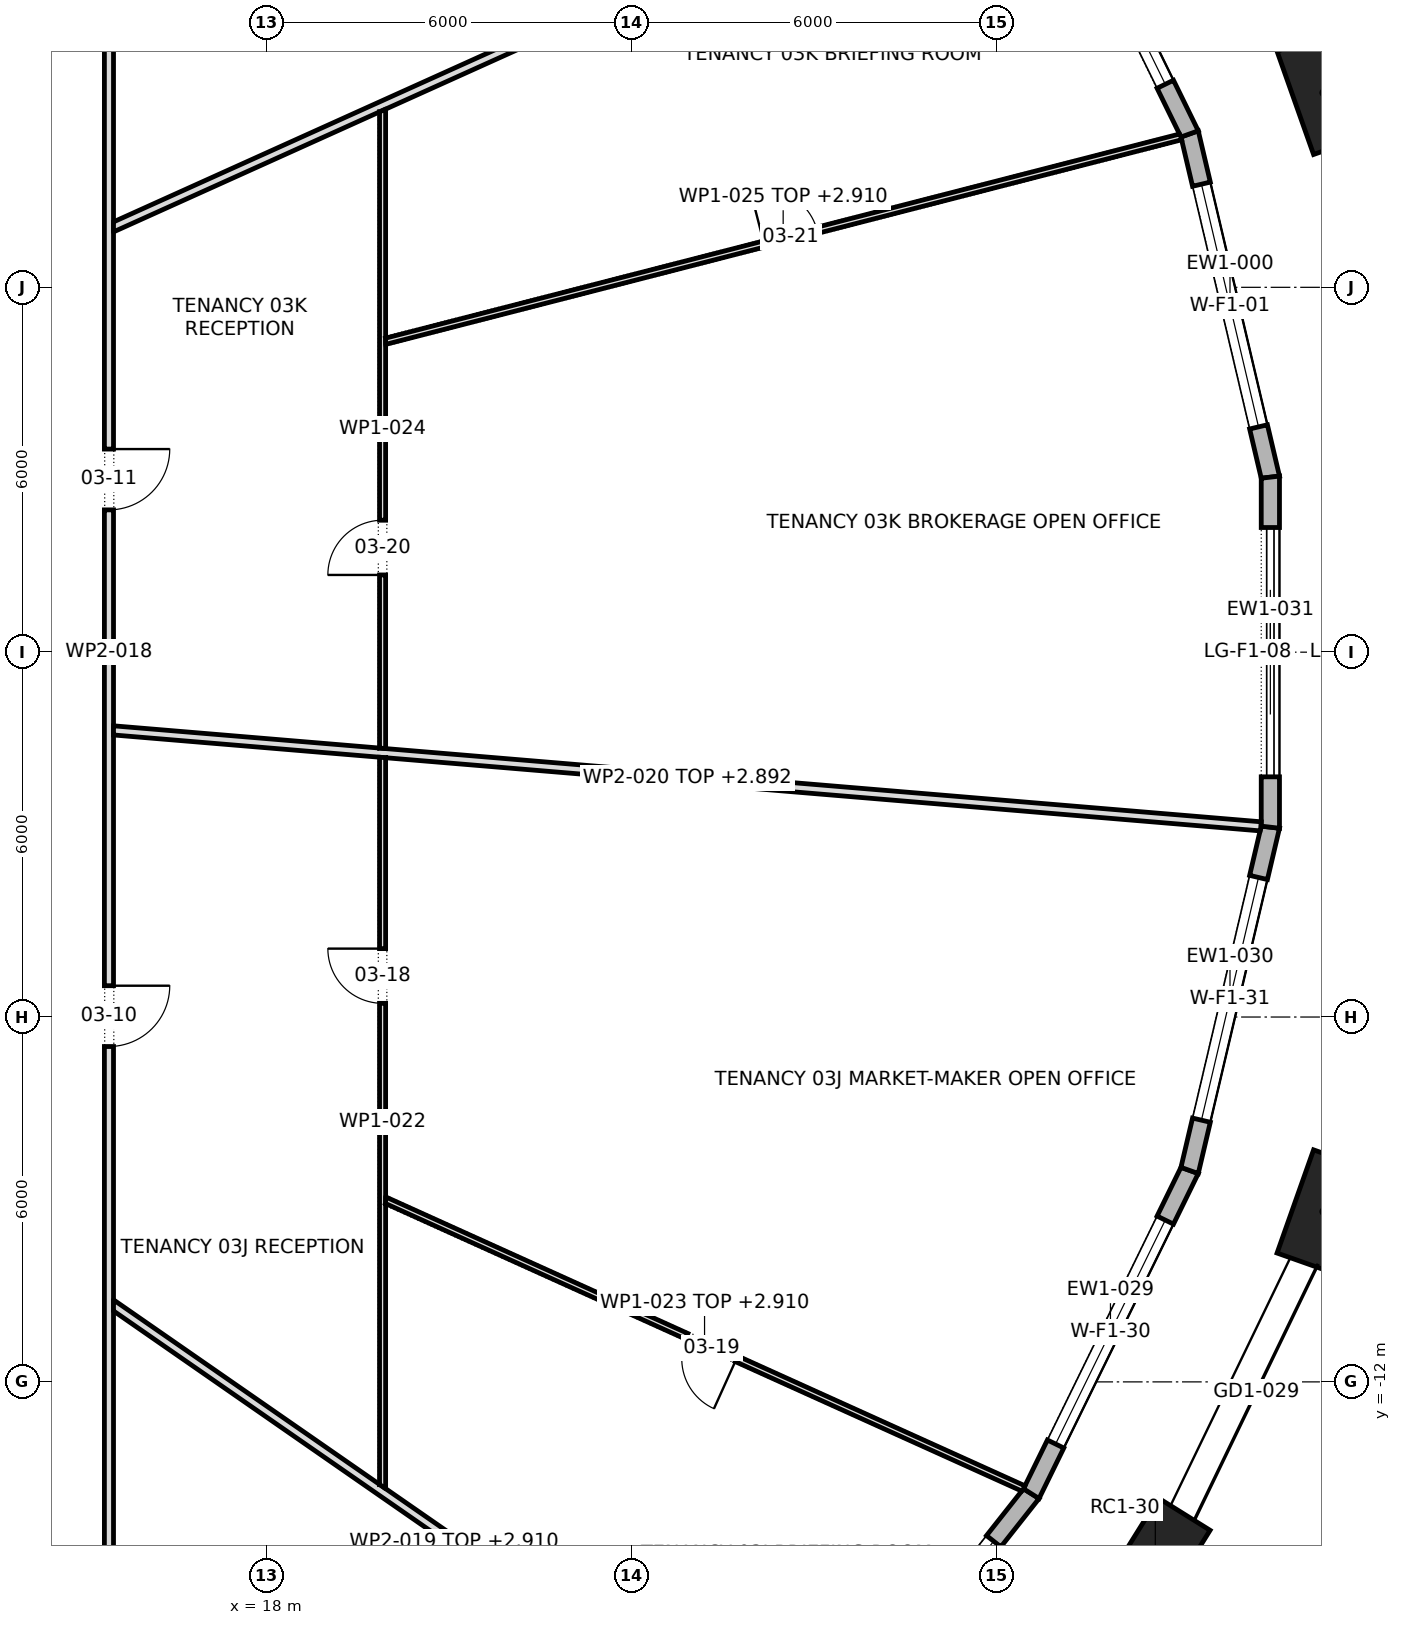
"""IFC4 building model, lengths in metres.
Left out: names, types, materials, properties, quantities, classifications, styles, units other than length and angle.
Written with IfcOpenShell. Run it as: python <this file> out.ifc"""

import sys

from ifc_helpers import new_model, si_unit, direction, frame, frame_2d, origin, origin_2d, place, context, subcontext, project, spatial, polyline, rectangle, outline, extrude, element, fill, save


model = new_model("IFC4")
c1 = context("Model", 3, precision=1e-05, world=origin(), true_north=direction((0.0, 1.0)))
c2 = subcontext(c1, "Body", "Model", "MODEL_VIEW")
j1 = project(units=[si_unit("LENGTHUNIT", "METRE"), si_unit("PLANEANGLEUNIT", "RADIAN")], contexts=[c1])
p1 = place(None, origin())
s1 = spatial("IfcSite", under=j1, at=p1, CompositionType="ELEMENT")
p2 = place(p1, origin())
s2 = spatial("IfcBuilding", under=s1, at=p2, CompositionType="ELEMENT")
p3 = place(p2, frame((0.0, 0.0, 57.1)))
s3 = spatial("IfcBuildingStorey", under=s2, at=p3, CompositionType="ELEMENT", Elevation=57.1)
for number, where, z_axis, x_axis in (
    (1, (35.382, 9.2, 0.0), (0.0, 0.0, 1.0), (-0.334, 0.943, 0.0)),
    (2, (32.608, -14.939, 0.0), (0.0, 0.0, 1.0), (0.529, 0.849, 0.0)),
    (3, (35.382, -9.2, 0.0), (0.0, 0.0, 1.0), (0.334, 0.943, 0.0)),
):
    element("IfcColumn", number, at=place(p3, frame(where, z_axis=z_axis, x_axis=x_axis)), inside=s3, PredefinedType="COLUMN", context=c2, shape_type="SweptSolid", body=[
        extrude(rectangle(XDim=1.8, YDim=1.0, at=origin_2d()), origin(), (0.0, 0.0, 1.0), 4.2),
    ])
p4 = place(p3, frame((34.5, 2.878, 0.0), z_axis=(0.0, 0.0, 1.0), x_axis=(-0.228990053972, 0.973428762253, 0.0)))
e4 = element("IfcWall", 4, at=p4, inside=s3, PredefinedType="STANDARD", context=c2, shape_type="SweptSolid", body=[
    extrude(outline(polyline([(-0.017, -0.15), (5.816, -0.15), (5.782, 0.15), (0.017, 0.15), (-0.017, -0.15)])), origin(), (0.0, 0.0, 1.0), 3.9),
])
p5 = place(p4, frame((0.849, 0.0, 0.6)))
e5 = element("IfcOpeningElement", 5, at=p5, cuts=e4, PredefinedType="OPENING", context=c2, shape_type="SweptSolid", body=[
    extrude(rectangle(XDim=4.1, YDim=2.85, at=frame_2d((2.05, 1.425))), frame((0.0, 0.162, 0.0), z_axis=(0.0, -1.0, 0.0), x_axis=(1.0, 0.0, 0.0)), (0.0, 0.0, 1.0), 0.324),
])
p6 = place(p3, frame((33.172, 8.523, 0.0), z_axis=(0.0, 0.0, 1.0), x_axis=(-0.439906146647, 0.898043752911, 0.0)))
e6 = element("IfcWall", 6, at=p6, inside=s3, PredefinedType="STANDARD", context=c2, shape_type="SweptSolid", body=[
    extrude(outline(polyline([(-0.017, -0.15), (5.935, -0.15), (5.903, 0.15), (0.017, 0.15), (-0.017, -0.15)])), origin(), (0.0, 0.0, 1.0), 3.9),
])
p7 = place(p6, frame((0.909, 0.0, 0.6)))
e7 = element("IfcOpeningElement", 7, at=p7, cuts=e6, PredefinedType="OPENING", context=c2, shape_type="SweptSolid", body=[
    extrude(rectangle(XDim=4.1, YDim=2.85, at=frame_2d((2.05, 1.425))), frame((0.0, 0.162, 0.0), z_axis=(0.0, -1.0, 0.0), x_axis=(1.0, 0.0, 0.0)), (0.0, 0.0, 1.0), 0.324),
])
p8 = place(p3, frame((26.79, -18.62, 0.0), z_axis=(0.0, 0.0, 1.0), x_axis=(0.619993638342, 0.78460683684, 0.0)))
e8 = element("IfcWall", 8, at=p8, inside=s3, PredefinedType="STANDARD", context=c2, shape_type="SweptSolid", body=[
    extrude(outline(polyline([(-0.015, -0.15), (6.11, -0.15), (6.078, 0.15), (0.015, 0.15), (-0.015, -0.15)])), origin(), (0.0, 0.0, 1.0), 3.9),
])
p9 = place(p8, frame((0.997, 0.0, 0.6)))
e9 = element("IfcOpeningElement", 9, at=p9, cuts=e8, PredefinedType="OPENING", context=c2, shape_type="SweptSolid", body=[
    extrude(rectangle(XDim=4.1, YDim=2.85, at=frame_2d((2.05, 1.425))), frame((0.0, 0.162, 0.0), z_axis=(0.0, -1.0, 0.0), x_axis=(1.0, 0.0, 0.0)), (0.0, 0.0, 1.0), 0.324),
])
p10 = place(p3, frame((30.568, -13.838, 0.0), z_axis=(0.0, 0.0, 1.0), x_axis=(0.439906146647, 0.898043752911, 0.0)))
e10 = element("IfcWall", 10, at=p10, inside=s3, PredefinedType="STANDARD", context=c2, shape_type="SweptSolid", body=[
    extrude(outline(polyline([(-0.016, -0.15), (5.936, -0.15), (5.902, 0.15), (0.016, 0.15), (-0.016, -0.15)])), origin(), (0.0, 0.0, 1.0), 3.9),
])
p11 = place(p10, frame((0.909, 0.0, 0.6)))
e11 = element("IfcOpeningElement", 11, at=p11, cuts=e10, PredefinedType="OPENING", context=c2, shape_type="SweptSolid", body=[
    extrude(rectangle(XDim=4.1, YDim=2.85, at=frame_2d((2.05, 1.425))), frame((0.0, 0.162, 0.0), z_axis=(0.0, -1.0, 0.0), x_axis=(1.0, 0.0, 0.0)), (0.0, 0.0, 1.0), 0.324),
])
p12 = place(p3, frame((33.172, -8.523, 0.0), z_axis=(0.0, 0.0, 1.0), x_axis=(0.228990053972, 0.973428762253, 0.0)))
e12 = element("IfcWall", 12, at=p12, inside=s3, PredefinedType="STANDARD", context=c2, shape_type="SweptSolid", body=[
    extrude(outline(polyline([(-0.017, -0.15), (5.816, -0.15), (5.781, 0.15), (0.017, 0.15), (-0.017, -0.15)])), origin(), (0.0, 0.0, 1.0), 3.9),
])
p13 = place(p12, frame((0.849, 0.0, 0.6)))
e13 = element("IfcOpeningElement", 13, at=p13, cuts=e12, PredefinedType="OPENING", context=c2, shape_type="SweptSolid", body=[
    extrude(rectangle(XDim=4.1, YDim=2.85, at=frame_2d((2.05, 1.425))), frame((0.0, 0.162, 0.0), z_axis=(0.0, -1.0, 0.0), x_axis=(1.0, 0.0, 0.0)), (0.0, 0.0, 1.0), 0.324),
])
p14 = place(p3, frame((34.5, -2.878, 0.0), z_axis=(0.0, 0.0, 1.0), x_axis=(0.0, 1.0, 0.0)))
e14 = element("IfcWall", 14, at=p14, inside=s3, PredefinedType="STANDARD", context=c2, shape_type="SweptSolid", body=[
    extrude(outline(polyline([(-0.017, -0.15), (5.773, -0.15), (5.739, 0.15), (0.017, 0.15), (-0.017, -0.15)])), origin(), (0.0, 0.0, 1.0), 3.9),
])
p15 = place(p14, frame((0.828, 0.0, 0.0)))
e15 = element("IfcOpeningElement", 15, at=p15, cuts=e14, PredefinedType="OPENING", context=c2, shape_type="SweptSolid", body=[
    extrude(rectangle(XDim=4.1, YDim=3.45, at=frame_2d((2.05, 1.725))), frame((0.0, 0.162, 0.0), z_axis=(0.0, -1.0, 0.0), x_axis=(1.0, 0.0, 0.0)), (0.0, 0.0, 1.0), 0.324),
])
p16 = place(p3, frame((15.4, -15.475, 0.0), z_axis=(0.0, 0.0, 1.0), x_axis=(0.0, 1.0, 0.0)))
e16 = element("IfcWall", 16, at=p16, inside=s3, PredefinedType="PARTITIONING", context=c2, shape_type="SweptSolid", body=[
    extrude(outline(polyline([(0.0, -0.075), (1.935, -0.075), (3.869, -0.075), (5.803, -0.075), (7.738, -0.075), (9.672, -0.075), (11.606, -0.075), (13.541, -0.075), (15.475, -0.075), (17.409, -0.075), (19.344, -0.075), (21.278, -0.075), (23.212, -0.075), (25.147, -0.075), (27.081, -0.075), (29.016, -0.075), (30.95, -0.075), (30.8, 0.075), (28.885, 0.075), (26.969, 0.075), (25.053, 0.075), (23.138, 0.075), (21.222, 0.075), (19.306, 0.075), (17.391, 0.075), (15.475, 0.075), (13.56, 0.075), (11.644, 0.075), (9.728, 0.075), (7.812, 0.075), (5.897, 0.075), (3.981, 0.075), (2.066, 0.075), (0.15, 0.075), (0.0, -0.075)])), origin(), (0.0, 0.0, 1.0), 3.9),
])
p17 = place(p16, frame((8.99, 0.0, 0.0)))
e17 = element("IfcOpeningElement", 17, at=p17, cuts=e16, PredefinedType="OPENING", context=c2, shape_type="SweptSolid", body=[
    extrude(rectangle(XDim=1.0, YDim=2.1, at=frame_2d((0.5, 1.05))), frame((0.0, 0.087, 0.0), z_axis=(0.0, -1.0, 0.0), x_axis=(1.0, 0.0, 0.0)), (0.0, 0.0, 1.0), 0.174),
])
p18 = place(p16, frame((17.815, 0.0, 0.0)))
e18 = element("IfcOpeningElement", 18, at=p18, cuts=e16, PredefinedType="OPENING", context=c2, shape_type="SweptSolid", body=[
    extrude(rectangle(XDim=1.0, YDim=2.1, at=frame_2d((0.5, 1.05))), frame((0.0, 0.087, 0.0), z_axis=(0.0, -1.0, 0.0), x_axis=(1.0, 0.0, 0.0)), (0.0, 0.0, 1.0), 0.174),
])
p19 = place(p16, frame((26.155, 0.0, 0.0)))
e19 = element("IfcOpeningElement", 19, at=p19, cuts=e16, PredefinedType="OPENING", context=c2, shape_type="SweptSolid", body=[
    extrude(rectangle(XDim=1.0, YDim=2.1, at=frame_2d((0.5, 1.05))), frame((0.0, 0.087, 0.0), z_axis=(0.0, -1.0, 0.0), x_axis=(1.0, 0.0, 0.0)), (0.0, 0.0, 1.0), 0.174),
])
p20 = place(p3, frame((15.433, -10.712, 0.0), z_axis=(0.0, 0.0, 1.0), x_axis=(0.82159356676, -0.570073689148, 0.0)))
e20 = element("IfcWall", 20, at=p20, inside=s3, PredefinedType="PARTITIONING", context=c2, shape_type="SweptSolid", body=[
    extrude(outline(polyline([(0.104, -0.075), (2.042, -0.075), (3.979, -0.075), (5.917, -0.075), (7.855, -0.075), (9.793, -0.075), (11.731, -0.075), (13.669, -0.075), (13.69, 0.002), (13.694, 0.074), (13.694, 0.075), (12.021, 0.075), (10.349, 0.075), (8.676, 0.075), (7.004, 0.075), (5.331, 0.075), (5.327, 0.072), (5.325, 0.075), (3.55, 0.075), (1.775, 0.075), (0.0, 0.075), (0.0, 0.074), (0.104, -0.075)])), origin(), (0.0, 0.0, 1.0), 2.91),
])
p21 = place(p3, frame((15.469, -1.286, 0.0), z_axis=(0.0, 0.0, 1.0), x_axis=(0.996520554602, -0.083347371018, 0.0)))
e21 = element("IfcWall", 21, at=p21, inside=s3, PredefinedType="PARTITIONING", context=c2, shape_type="SweptSolid", body=[
    extrude(outline(polyline([(0.012, -0.075), (1.506, -0.075), (2.999, -0.075), (4.492, -0.075), (4.503, -0.074), (4.503, -0.075), (6.307, -0.075), (8.111, -0.075), (9.915, -0.075), (11.719, -0.075), (13.523, -0.075), (15.327, -0.075), (17.131, -0.075), (18.935, -0.075), (18.94, -0.038), (18.94, 0.075), (17.122, 0.075), (15.304, 0.075), (13.486, 0.075), (11.667, 0.075), (9.849, 0.075), (8.031, 0.075), (6.213, 0.075), (4.395, 0.075), (4.39, 0.074), (4.39, 0.075), (2.927, 0.075), (1.463, 0.075), (0.0, 0.075), (0.012, -0.075)])), origin(), (0.0, 0.0, 1.0), 2.892),
])
p22 = place(p3, frame((15.444, 6.98, 0.0), z_axis=(0.0, 0.0, 1.0), x_axis=(0.911545333682, 0.411199592221, 0.0)))
e22 = element("IfcWall", 22, at=p22, inside=s3, PredefinedType="PARTITIONING", context=c2, shape_type="SweptSolid", body=[
    extrude(outline(polyline([(0.0, -0.075), (1.6, -0.075), (3.2, -0.075), (4.8, -0.075), (4.801, -0.073), (4.805, -0.075), (6.747, -0.075), (8.69, -0.075), (10.632, -0.075), (12.574, -0.075), (14.517, -0.075), (16.459, -0.075), (16.459, -0.072), (16.457, 0.012), (16.441, 0.075), (14.622, 0.075), (12.802, 0.075), (10.983, 0.075), (9.164, 0.075), (7.345, 0.075), (5.525, 0.075), (3.706, 0.075), (1.887, 0.075), (0.068, 0.075), (0.0, -0.075)])), origin(), (0.0, 0.0, 1.0), 2.91),
])
p23 = place(p3, frame((19.9, -13.756, 0.0), z_axis=(0.0, 0.0, 1.0), x_axis=(0.0, 1.0, 0.0)))
e23 = element("IfcWall", 23, at=p23, inside=s3, PredefinedType="PARTITIONING", context=c2, shape_type="SweptSolid", body=[
    extrude(outline(polyline([(0.0, -0.05), (1.563, -0.05), (3.125, -0.05), (4.688, -0.05), (4.689, -0.048), (4.694, -0.05), (6.525, -0.05), (8.357, -0.05), (10.188, -0.05), (12.02, -0.05), (12.028, 0.049), (12.028, 0.05), (10.035, 0.05), (8.042, 0.05), (6.049, 0.05), (4.056, 0.05), (2.062, 0.05), (0.069, 0.05), (0.0, -0.05), (0.0, -0.05)])), origin(), (0.0, 0.0, 1.0), 3.9),
])
p24 = place(p23, frame((7.98, 0.0, 0.0)))
e24 = element("IfcOpeningElement", 24, at=p24, cuts=e23, PredefinedType="OPENING", context=c2, shape_type="SweptSolid", body=[
    extrude(rectangle(XDim=0.9, YDim=2.1, at=frame_2d((0.45, 1.05))), frame((0.0, 0.062, 0.0), z_axis=(0.0, -1.0, 0.0), x_axis=(1.0, 0.0, 0.0)), (0.0, 0.0, 1.0), 0.124),
])
p25 = place(p3, frame((19.93, -9.003, 0.0), z_axis=(0.0, 0.0, 1.0), x_axis=(0.911257901719, -0.41183617684, 0.0)))
e25 = element("IfcWall", 25, at=p25, inside=s3, PredefinedType="PARTITIONING", context=c2, shape_type="SweptSolid", body=[
    extrude(outline(polyline([(0.045, -0.05), (1.958, -0.05), (3.871, -0.05), (5.785, -0.05), (7.698, -0.05), (9.611, -0.05), (11.524, -0.05), (11.536, -0.004), (11.537, 0.048), (11.537, 0.05), (9.615, 0.05), (7.692, 0.05), (5.769, 0.05), (3.846, 0.05), (1.923, 0.05), (0.0, 0.05), (0.0, 0.049), (0.045, -0.05)])), origin(), (0.0, 0.0, 1.0), 2.91),
])
p26 = place(p25, frame((5.454, 0.0, 0.0)))
e26 = element("IfcOpeningElement", 26, at=p26, cuts=e25, PredefinedType="OPENING", context=c2, shape_type="SweptSolid", body=[
    extrude(rectangle(XDim=0.9, YDim=2.1, at=frame_2d((0.45, 1.05))), frame((0.0, 0.062, 0.0), z_axis=(0.0, -1.0, 0.0), x_axis=(1.0, 0.0, 0.0)), (0.0, 0.0, 1.0), 0.124),
])
p27 = place(p3, frame((19.9, -1.585, 0.0), z_axis=(0.0, 0.0, 1.0), x_axis=(0.0, 1.0, 0.0)))
e27 = element("IfcWall", 27, at=p27, inside=s3, PredefinedType="PARTITIONING", context=c2, shape_type="SweptSolid", body=[
    extrude(outline(polyline([(0.0, -0.05), (1.686, -0.05), (3.371, -0.05), (5.056, -0.05), (6.742, -0.05), (6.749, -0.048), (6.75, -0.05), (8.632, -0.05), (10.515, -0.05), (10.515, -0.049), (10.47, 0.05), (8.726, 0.05), (6.983, 0.05), (5.239, 0.05), (3.495, 0.05), (1.752, 0.05), (0.008, 0.05), (0.0, -0.046), (0.0, -0.05)])), origin(), (0.0, 0.0, 1.0), 3.9),
])
p28 = place(p27, frame((2.855, 0.0, 0.0)))
e28 = element("IfcOpeningElement", 28, at=p28, cuts=e27, PredefinedType="OPENING", context=c2, shape_type="SweptSolid", body=[
    extrude(rectangle(XDim=0.9, YDim=2.1, at=frame_2d((0.45, 1.05))), frame((0.0, 0.062, 0.0), z_axis=(0.0, -1.0, 0.0), x_axis=(1.0, 0.0, 0.0)), (0.0, 0.0, 1.0), 0.124),
])
p29 = place(p3, frame((19.938, 5.11, 0.0), z_axis=(0.0, 0.0, 1.0), x_axis=(0.968505877435, 0.248990693348, 0.0)))
e29 = element("IfcWall", 29, at=p29, inside=s3, PredefinedType="PARTITIONING", context=c2, shape_type="SweptSolid", body=[
    extrude(outline(polyline([(13.515, -0.05), (13.515, 0.003), (13.506, 0.05), (11.58, 0.05), (9.654, 0.05), (7.729, 0.05), (5.803, 0.05), (3.877, 0.05), (1.951, 0.05), (0.026, 0.05), (0.0, -0.049), (0.0, -0.05), (1.931, -0.05), (3.862, -0.05), (5.792, -0.05), (7.723, -0.05), (9.654, -0.05), (11.585, -0.05), (13.515, -0.05)])), origin(), (0.0, 0.0, 1.0), 2.91),
])
p30 = place(p29, frame((6.439, 0.0, 0.0)))
e30 = element("IfcOpeningElement", 30, at=p30, cuts=e29, PredefinedType="OPENING", context=c2, shape_type="SweptSolid", body=[
    extrude(rectangle(XDim=0.9, YDim=2.1, at=frame_2d((0.45, 1.05))), frame((0.0, 0.062, 0.0), z_axis=(0.0, -1.0, 0.0), x_axis=(1.0, 0.0, 0.0)), (0.0, 0.0, 1.0), 0.124),
])
p31 = place(p5, origin())
e31 = element("IfcWindow", 31, at=p31, inside=s3, PartitioningType="TRIPLE_PANEL_VERTICAL", PredefinedType="WINDOW", context=c2, shape_type="SweptSolid", body=[
    extrude(rectangle(XDim=4.1, YDim=2.85, at=frame_2d((2.05, 1.425))), frame((0.0, 0.03, 0.0), z_axis=(0.0, -1.0, 0.0), x_axis=(1.0, 0.0, 0.0)), (0.0, 0.0, 1.0), 0.06),
])
fill(e5, e31)
p32 = place(p7, origin())
e32 = element("IfcWindow", 32, at=p32, inside=s3, PartitioningType="TRIPLE_PANEL_VERTICAL", PredefinedType="WINDOW", context=c2, shape_type="SweptSolid", body=[
    extrude(rectangle(XDim=4.1, YDim=2.85, at=frame_2d((2.05, 1.425))), frame((0.0, 0.03, 0.0), z_axis=(0.0, -1.0, 0.0), x_axis=(1.0, 0.0, 0.0)), (0.0, 0.0, 1.0), 0.06),
])
fill(e7, e32)
p33 = place(p9, origin())
e33 = element("IfcWindow", 33, at=p33, inside=s3, PartitioningType="TRIPLE_PANEL_VERTICAL", PredefinedType="WINDOW", context=c2, shape_type="SweptSolid", body=[
    extrude(rectangle(XDim=4.1, YDim=2.85, at=frame_2d((2.05, 1.425))), frame((0.0, 0.03, 0.0), z_axis=(0.0, -1.0, 0.0), x_axis=(1.0, 0.0, 0.0)), (0.0, 0.0, 1.0), 0.06),
])
fill(e9, e33)
p34 = place(p11, origin())
e34 = element("IfcWindow", 34, at=p34, inside=s3, PartitioningType="TRIPLE_PANEL_VERTICAL", PredefinedType="WINDOW", context=c2, shape_type="SweptSolid", body=[
    extrude(rectangle(XDim=4.1, YDim=2.85, at=frame_2d((2.05, 1.425))), frame((0.0, 0.03, 0.0), z_axis=(0.0, -1.0, 0.0), x_axis=(1.0, 0.0, 0.0)), (0.0, 0.0, 1.0), 0.06),
])
fill(e11, e34)
p35 = place(p13, origin())
e35 = element("IfcWindow", 35, at=p35, inside=s3, PartitioningType="TRIPLE_PANEL_VERTICAL", PredefinedType="WINDOW", context=c2, shape_type="SweptSolid", body=[
    extrude(rectangle(XDim=4.1, YDim=2.85, at=frame_2d((2.05, 1.425))), frame((0.0, 0.03, 0.0), z_axis=(0.0, -1.0, 0.0), x_axis=(1.0, 0.0, 0.0)), (0.0, 0.0, 1.0), 0.06),
])
fill(e13, e35)
p36 = place(p15, origin())
e36 = element("IfcDoor", 36, at=p36, inside=s3, OperationType="DOUBLE_DOOR_SLIDING", PredefinedType="DOOR", context=c2, shape_type="SweptSolid", body=[
    extrude(rectangle(XDim=4.1, YDim=3.45, at=frame_2d((2.05, 1.725))), frame((0.0, 0.025, 0.0), z_axis=(0.0, -1.0, 0.0), x_axis=(1.0, 0.0, 0.0)), (0.0, 0.0, 1.0), 0.05),
])
fill(e15, e36)
p37 = place(p17, frame((1.0, 0.0, 0.0), z_axis=(0.0, 0.0, 1.0), x_axis=(-1.0, 0.0, 0.0)))
e37 = element("IfcDoor", 37, at=p37, inside=s3, OperationType="SINGLE_SWING_RIGHT", PredefinedType="DOOR", context=c2, shape_type="SweptSolid", body=[
    extrude(rectangle(XDim=1.0, YDim=2.1, at=frame_2d((0.5, 1.05))), frame((0.0, 0.025, 0.0), z_axis=(0.0, -1.0, 0.0), x_axis=(1.0, 0.0, 0.0)), (0.0, 0.0, 1.0), 0.05),
])
fill(e17, e37)
p38 = place(p18, frame((1.0, 0.0, 0.0), z_axis=(0.0, 0.0, 1.0), x_axis=(-1.0, 0.0, 0.0)))
e38 = element("IfcDoor", 38, at=p38, inside=s3, OperationType="SINGLE_SWING_RIGHT", PredefinedType="DOOR", context=c2, shape_type="SweptSolid", body=[
    extrude(rectangle(XDim=1.0, YDim=2.1, at=frame_2d((0.5, 1.05))), frame((0.0, 0.025, 0.0), z_axis=(0.0, -1.0, 0.0), x_axis=(1.0, 0.0, 0.0)), (0.0, 0.0, 1.0), 0.05),
])
fill(e18, e38)
p39 = place(p24, origin())
e39 = element("IfcDoor", 39, at=p39, inside=s3, OperationType="SINGLE_SWING_LEFT", PredefinedType="DOOR", context=c2, shape_type="SweptSolid", body=[
    extrude(rectangle(XDim=0.9, YDim=2.1, at=frame_2d((0.45, 1.05))), frame((0.0, 0.025, 0.0), z_axis=(0.0, -1.0, 0.0), x_axis=(1.0, 0.0, 0.0)), (0.0, 0.0, 1.0), 0.05),
])
fill(e24, e39)
p40 = place(p26, frame((0.9, 0.0, 0.0), z_axis=(0.0, 0.0, 1.0), x_axis=(-1.0, 0.0, 0.0)))
e40 = element("IfcDoor", 40, at=p40, inside=s3, OperationType="SINGLE_SWING_RIGHT", PredefinedType="DOOR", context=c2, shape_type="SweptSolid", body=[
    extrude(rectangle(XDim=0.9, YDim=2.1, at=frame_2d((0.45, 1.05))), frame((0.0, 0.025, 0.0), z_axis=(0.0, -1.0, 0.0), x_axis=(1.0, 0.0, 0.0)), (0.0, 0.0, 1.0), 0.05),
])
fill(e26, e40)
p41 = place(p28, origin())
e41 = element("IfcDoor", 41, at=p41, inside=s3, OperationType="SINGLE_SWING_RIGHT", PredefinedType="DOOR", context=c2, shape_type="SweptSolid", body=[
    extrude(rectangle(XDim=0.9, YDim=2.1, at=frame_2d((0.45, 1.05))), frame((0.0, 0.025, 0.0), z_axis=(0.0, -1.0, 0.0), x_axis=(1.0, 0.0, 0.0)), (0.0, 0.0, 1.0), 0.05),
])
fill(e28, e41)
p42 = place(p30, origin())
e42 = element("IfcDoor", 42, at=p42, inside=s3, OperationType="SINGLE_SWING_RIGHT", PredefinedType="DOOR", context=c2, shape_type="SweptSolid", body=[
    extrude(rectangle(XDim=0.9, YDim=2.1, at=frame_2d((0.45, 1.05))), frame((0.0, 0.025, 0.0), z_axis=(0.0, -1.0, 0.0), x_axis=(1.0, 0.0, 0.0)), (0.0, 0.0, 1.0), 0.05),
])
fill(e30, e42)
save(model, sys.argv[1])
